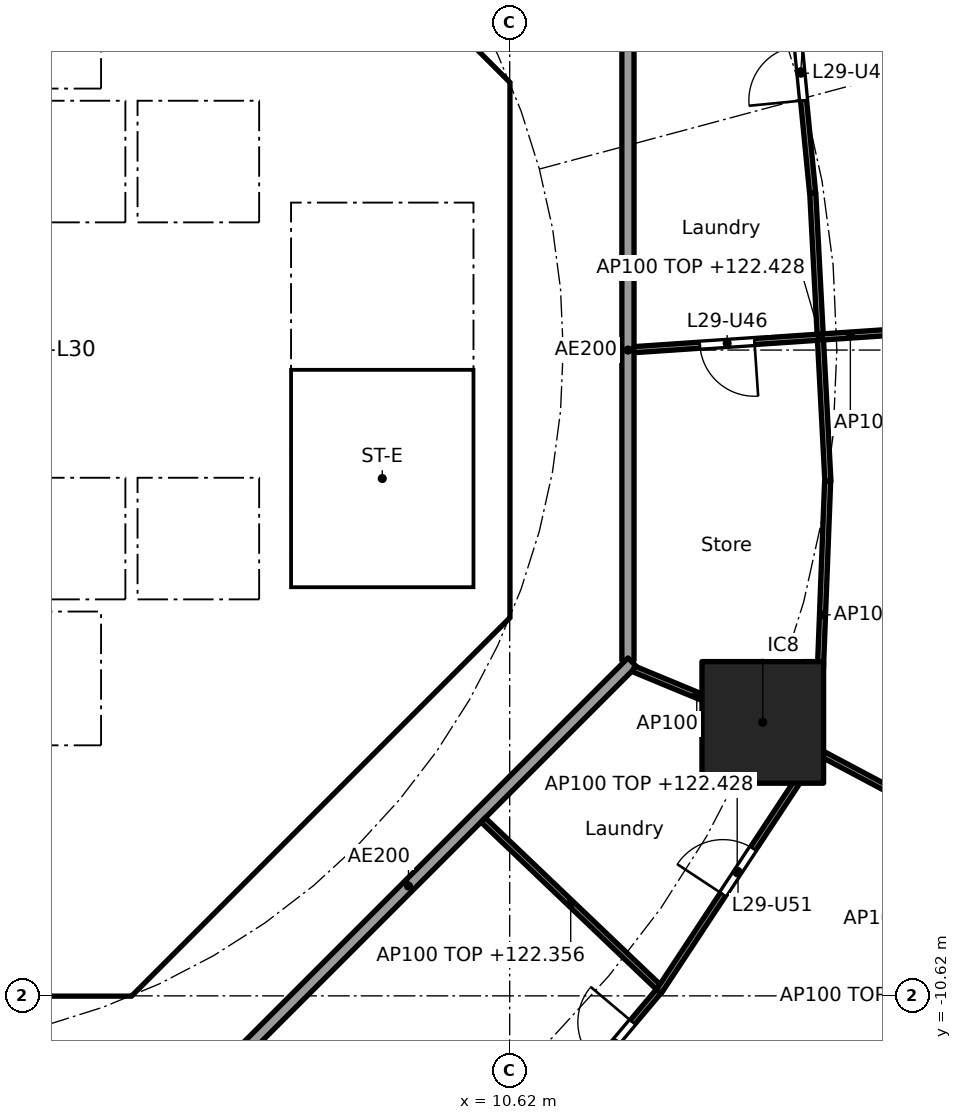
"""IFC4 building model, lengths in metres.
Left out: names, types, materials, properties, quantities, classifications, styles, units other than length and angle.
Written with IfcOpenShell. Run it as: python <this file> out.ifc"""

import sys

from ifc_helpers import new_model, si_unit, direction, frame, frame_2d, origin, origin_2d, place, context, subcontext, project, spatial, polyline, rectangle, outline, extrude, element, fill, save


model = new_model("IFC4")
c1 = context("Model", 3, precision=1e-05, world=origin(), true_north=direction((0.0, 1.0)))
c2 = subcontext(c1, "Body", "Model", "MODEL_VIEW")
j1 = project(units=[si_unit("LENGTHUNIT", "METRE"), si_unit("PLANEANGLEUNIT", "RADIAN")], contexts=[c1])
p1 = place(None, origin())
s1 = spatial("IfcSite", under=j1, at=p1, CompositionType="ELEMENT")
p2 = place(p1, origin())
s2 = spatial("IfcBuilding", under=s1, at=p2, CompositionType="ELEMENT")
p3 = place(p2, frame((0.0, 0.0, 119.6)))
s3 = spatial("IfcBuildingStorey", under=s2, at=p3, CompositionType="ELEMENT", Elevation=119.6)
p4 = place(p3, frame((14.782, -6.123, 0.0), z_axis=(0.0, 0.0, 1.0), x_axis=(1.0, 0.0, 0.0)))
e1 = element("IfcColumn", 1, at=p4, inside=s3, PredefinedType="COLUMN", context=c2, shape_type="SweptSolid", body=[
    extrude(rectangle(XDim=2.0, YDim=2.0, at=origin_2d()), origin(), (0.0, 0.0, 1.0), 3.7),
])
p5 = place(p3, frame((9.988, 4.613, 0.0), z_axis=(0.0, 0.0, 1.0), x_axis=(-0.707106781187, 0.707106781187, 0.0)))
e2 = element("IfcWall", 2, at=p5, inside=s3, PredefinedType="SHEAR", context=c2, shape_type="SweptSolid", body=[
    extrude(rectangle(XDim=7.602, YDim=0.6, at=frame_2d((3.801, 0.0))), origin(), (0.0, 0.0, 1.0), 3.44),
])
p6 = place(p5, frame((3.201, 0.0, 0.0)))
e3 = element("IfcOpeningElement", 3, at=p6, cuts=e2, PredefinedType="OPENING", context=c2, shape_type="SweptSolid", body=[
    extrude(rectangle(XDim=1.2, YDim=2.1, at=frame_2d((0.6, 1.05))), frame((0.0, 0.31, 0.0), z_axis=(0.0, -1.0, 0.0), x_axis=(1.0, 0.0, 0.0)), (0.0, 0.0, 1.0), 0.62),
])
p7 = place(p3, frame((4.613, -9.988, 0.0), z_axis=(0.0, 0.0, 1.0), x_axis=(0.707106781187, 0.707106781187, 0.0)))
e4 = element("IfcWall", 4, at=p7, inside=s3, PredefinedType="SHEAR", context=c2, shape_type="SweptSolid", body=[
    extrude(rectangle(XDim=7.602, YDim=0.6, at=frame_2d((3.801, 0.0))), origin(), (0.0, 0.0, 1.0), 3.44),
])
p8 = place(p7, frame((3.201, 0.0, 0.0)))
e5 = element("IfcOpeningElement", 5, at=p8, cuts=e4, PredefinedType="OPENING", context=c2, shape_type="SweptSolid", body=[
    extrude(rectangle(XDim=1.2, YDim=2.1, at=frame_2d((0.6, 1.05))), frame((0.0, 0.31, 0.0), z_axis=(0.0, -1.0, 0.0), x_axis=(1.0, 0.0, 0.0)), (0.0, 0.0, 1.0), 0.62),
])
p9 = place(p3, frame((4.0, 4.3, 0.0), z_axis=(0.0, 0.0, 1.0), x_axis=(0.0, 1.0, 0.0)))
e6 = element("IfcWall", 6, at=p9, inside=s3, PredefinedType="SOLIDWALL", context=c2, shape_type="SweptSolid", body=[
    extrude(rectangle(XDim=2.2, YDim=0.2, at=frame_2d((1.1, 0.0))), origin(), (0.0, 0.0, 1.0), 3.44),
])
p10 = place(p9, frame((0.55, 0.0, 0.0)))
e7 = element("IfcOpeningElement", 7, at=p10, cuts=e6, PredefinedType="OPENING", context=c2, shape_type="SweptSolid", body=[
    extrude(rectangle(XDim=1.1, YDim=2.1, at=frame_2d((0.55, 1.05))), frame((0.0, 0.11, 0.0), z_axis=(0.0, -1.0, 0.0), x_axis=(1.0, 0.0, 0.0)), (0.0, 0.0, 1.0), 0.22),
])
p11 = place(p3, frame((-6.7, 2.0, 0.0), z_axis=(0.0, 0.0, 1.0), x_axis=(1.0, 0.0, 0.0)))
e8 = element("IfcWall", 8, at=p11, inside=s3, PredefinedType="SOLIDWALL", context=c2, shape_type="SweptSolid", body=[
    extrude(rectangle(XDim=13.4, YDim=0.2, at=frame_2d((6.7, 0.0))), origin(), (0.0, 0.0, 1.0), 3.44),
])
p12 = place(p11, frame((0.65, 0.0, 0.0)))
e9 = element("IfcOpeningElement", 9, at=p12, cuts=e8, PredefinedType="OPENING", context=c2, shape_type="SweptSolid", body=[
    extrude(rectangle(XDim=1.1, YDim=2.1, at=frame_2d((0.55, 1.05))), frame((0.0, 0.11, 0.0), z_axis=(0.0, -1.0, 0.0), x_axis=(1.0, 0.0, 0.0)), (0.0, 0.0, 1.0), 0.22),
])
p13 = place(p11, frame((2.85, 0.0, 0.0)))
e10 = element("IfcOpeningElement", 10, at=p13, cuts=e8, PredefinedType="OPENING", context=c2, shape_type="SweptSolid", body=[
    extrude(rectangle(XDim=1.1, YDim=2.1, at=frame_2d((0.55, 1.05))), frame((0.0, 0.11, 0.0), z_axis=(0.0, -1.0, 0.0), x_axis=(1.0, 0.0, 0.0)), (0.0, 0.0, 1.0), 0.22),
])
p14 = place(p11, frame((5.05, 0.0, 0.0)))
e11 = element("IfcOpeningElement", 11, at=p14, cuts=e8, PredefinedType="OPENING", context=c2, shape_type="SweptSolid", body=[
    extrude(rectangle(XDim=1.1, YDim=2.1, at=frame_2d((0.55, 1.05))), frame((0.0, 0.11, 0.0), z_axis=(0.0, -1.0, 0.0), x_axis=(1.0, 0.0, 0.0)), (0.0, 0.0, 1.0), 0.22),
])
p15 = place(p3, frame((6.7, 4.0, 0.0), z_axis=(0.0, 0.0, 1.0), x_axis=(1.0, 0.0, 0.0)))
e12 = element("IfcWall", 12, at=p15, inside=s3, PredefinedType="SOLIDWALL", context=c2, shape_type="SweptSolid", body=[
    extrude(rectangle(XDim=3.325, YDim=0.2, at=frame_2d((1.662, 0.0))), origin(), (0.0, 0.0, 1.0), 3.44),
])
p16 = place(p15, frame((1.25, 0.0, 0.0)))
e13 = element("IfcOpeningElement", 13, at=p16, cuts=e12, PredefinedType="OPENING", context=c2, shape_type="SweptSolid", body=[
    extrude(rectangle(XDim=1.1, YDim=2.1, at=frame_2d((0.55, 1.05))), frame((0.0, 0.11, 0.0), z_axis=(0.0, -1.0, 0.0), x_axis=(1.0, 0.0, 0.0)), (0.0, 0.0, 1.0), 0.22),
])
p17 = place(p3, frame((4.0, -10.025, 0.0), z_axis=(0.0, 0.0, 1.0), x_axis=(0.0, 1.0, 0.0)))
e14 = element("IfcWall", 14, at=p17, inside=s3, PredefinedType="SOLIDWALL", context=c2, shape_type="SweptSolid", body=[
    extrude(rectangle(XDim=3.0, YDim=0.2, at=frame_2d((1.5, 0.0))), origin(), (0.0, 0.0, 1.0), 3.44),
])
p18 = place(p17, frame((0.975, 0.0, 0.0)))
e15 = element("IfcOpeningElement", 15, at=p18, cuts=e14, PredefinedType="OPENING", context=c2, shape_type="SweptSolid", body=[
    extrude(rectangle(XDim=1.1, YDim=2.1, at=frame_2d((0.55, 1.05))), frame((0.0, 0.11, 0.0), z_axis=(0.0, -1.0, 0.0), x_axis=(1.0, 0.0, 0.0)), (0.0, 0.0, 1.0), 0.22),
])
p19 = place(p3, frame((4.0, -6.5, 0.0), z_axis=(0.0, 0.0, 1.0), x_axis=(0.0, 1.0, 0.0)))
e16 = element("IfcWall", 16, at=p19, inside=s3, PredefinedType="SOLIDWALL", context=c2, shape_type="SweptSolid", body=[
    extrude(rectangle(XDim=2.2, YDim=0.2, at=frame_2d((1.1, 0.0))), origin(), (0.0, 0.0, 1.0), 3.44),
])
p20 = place(p19, frame((0.55, 0.0, 0.0)))
e17 = element("IfcOpeningElement", 17, at=p20, cuts=e16, PredefinedType="OPENING", context=c2, shape_type="SweptSolid", body=[
    extrude(rectangle(XDim=1.1, YDim=2.1, at=frame_2d((0.55, 1.05))), frame((0.0, 0.11, 0.0), z_axis=(0.0, -1.0, 0.0), x_axis=(1.0, 0.0, 0.0)), (0.0, 0.0, 1.0), 0.22),
])
p21 = place(p3, frame((-6.7, -2.0, 0.0), z_axis=(0.0, 0.0, 1.0), x_axis=(1.0, 0.0, 0.0)))
e18 = element("IfcWall", 18, at=p21, inside=s3, PredefinedType="SOLIDWALL", context=c2, shape_type="SweptSolid", body=[
    extrude(rectangle(XDim=13.4, YDim=0.2, at=frame_2d((6.7, 0.0))), origin(), (0.0, 0.0, 1.0), 3.44),
])
p22 = place(p21, frame((0.65, 0.0, 0.0)))
e19 = element("IfcOpeningElement", 19, at=p22, cuts=e18, PredefinedType="OPENING", context=c2, shape_type="SweptSolid", body=[
    extrude(rectangle(XDim=1.1, YDim=2.1, at=frame_2d((0.55, 1.05))), frame((0.0, 0.11, 0.0), z_axis=(0.0, -1.0, 0.0), x_axis=(1.0, 0.0, 0.0)), (0.0, 0.0, 1.0), 0.22),
])
p23 = place(p21, frame((2.85, 0.0, 0.0)))
e20 = element("IfcOpeningElement", 20, at=p23, cuts=e18, PredefinedType="OPENING", context=c2, shape_type="SweptSolid", body=[
    extrude(rectangle(XDim=1.1, YDim=2.1, at=frame_2d((0.55, 1.05))), frame((0.0, 0.11, 0.0), z_axis=(0.0, -1.0, 0.0), x_axis=(1.0, 0.0, 0.0)), (0.0, 0.0, 1.0), 0.22),
])
p24 = place(p3, origin())
e21 = element("IfcWall", 21, at=p24, inside=s3, PredefinedType="SHEAR", context=c2, shape_type="SweptSolid", body=[
    extrude(outline(polyline([(-4.152, -10.025), (4.152, -10.025), (4.401, -9.776), (4.825, -10.2), (4.401, -10.625), (-4.401, -10.625), (-4.825, -10.2), (-4.401, -9.776), (-4.152, -10.025)])), origin(), (0.0, 0.0, 1.0), 3.44),
])
p25 = place(p3, origin())
e22 = element("IfcWall", 22, at=p25, inside=s3, PredefinedType="SHEAR", context=c2, shape_type="SweptSolid", body=[
    extrude(outline(polyline([(9.776, -4.401), (10.025, -4.152), (10.025, -3.801), (10.025, 4.152), (9.776, 4.401), (10.2, 4.825), (10.625, 4.401), (10.625, -4.401), (10.2, -4.825), (9.776, -4.401)])), origin(), (0.0, 0.0, 1.0), 3.44),
])
p26 = place(p3, origin())
e23 = element("IfcWall", 23, at=p26, inside=s3, PredefinedType="SOLIDWALL", context=c2, shape_type="SweptSolid", body=[
    extrude(outline(polyline([(-6.7, -2.1), (-6.5, -2.1), (-6.5, -4.1), (-4.5, -4.1), (-4.5, -2.1), (-4.3, -2.1), (-4.3, -4.1), (-2.3, -4.1), (-2.3, -2.1), (-2.1, -2.1), (-2.1, -4.1), (-0.1, -4.1), (-0.1, -2.1), (0.1, -2.1), (0.1, -4.1), (2.1, -4.1), (2.1, -2.1), (2.3, -2.1), (2.3, -4.1), (4.3, -4.1), (4.3, -2.1), (4.5, -2.1), (4.5, -4.1), (6.5, -4.1), (6.5, -2.1), (6.7, -2.1), (6.7, -4.3), (-6.7, -4.3), (-6.7, -2.1)])), origin(), (0.0, 0.0, 1.0), 3.44),
])
p27 = place(p3, origin())
e24 = element("IfcWall", 24, at=p27, inside=s3, PredefinedType="SOLIDWALL", context=c2, shape_type="SweptSolid", body=[
    extrude(outline(polyline([(-6.5, 2.1), (-6.7, 2.1), (-6.7, 4.3), (6.7, 4.3), (6.7, 2.1), (6.5, 2.1), (6.5, 4.1), (4.5, 4.1), (4.5, 2.1), (4.3, 2.1), (4.3, 4.1), (2.3, 4.1), (2.3, 2.1), (2.1, 2.1), (2.1, 4.1), (0.1, 4.1), (0.1, 2.1), (-0.1, 2.1), (-0.1, 4.1), (-2.1, 4.1), (-2.1, 2.1), (-2.3, 2.1), (-2.3, 4.1), (-4.3, 4.1), (-4.3, 2.1), (-4.5, 2.1), (-4.5, 4.1), (-6.5, 4.1), (-6.5, 2.1)])), origin(), (0.0, 0.0, 1.0), 3.44),
])
p28 = place(p3, origin())
e25 = element("IfcWall", 25, at=p28, inside=s3, PredefinedType="SOLIDWALL", context=c2, shape_type="SweptSolid", body=[
    extrude(outline(polyline([(4.1, -7.025), (-4.1, -7.025), (-4.1, -6.5), (4.1, -6.5), (4.1, -7.025)])), origin(), (0.0, 0.0, 1.0), 3.44),
])
p29 = place(p3, origin())
e26 = element("IfcWall", 26, at=p29, inside=s3, PredefinedType="SOLIDWALL", context=c2, shape_type="SweptSolid", body=[
    extrude(outline(polyline([(7.025, -3.9), (6.7, -3.9), (6.7, 3.9), (7.025, 3.9), (7.025, -3.9)])), origin(), (0.0, 0.0, 1.0), 3.44),
])
p30 = place(p3, origin())
e27 = element("IfcWall", 27, at=p30, inside=s3, PredefinedType="SOLIDWALL", context=c2, shape_type="SweptSolid", body=[
    extrude(outline(polyline([(10.025, -4.1), (6.7, -4.1), (6.7, -3.9), (10.025, -3.9), (10.025, -4.1)])), origin(), (0.0, 0.0, 1.0), 3.44),
])
p31 = place(p3, frame((12.565, -5.104, 0.0), z_axis=(0.0, 0.0, 1.0), x_axis=(0.0, 1.0, 0.0)))
e28 = element("IfcWall", 28, at=p31, inside=s3, PredefinedType="PARTITIONING", context=c2, shape_type="SweptSolid", body=[
    extrude(rectangle(XDim=10.209, YDim=0.2, at=frame_2d((5.104, 0.0))), origin(), (0.0, 0.0, 1.0), 3.44),
])
p32 = place(p3, frame((5.275, -12.494, 0.0), z_axis=(0.0, 0.0, 1.0), x_axis=(0.707106781187, 0.707106781187, 0.0)))
e29 = element("IfcWall", 29, at=p32, inside=s3, PredefinedType="PARTITIONING", context=c2, shape_type="SweptSolid", body=[
    extrude(rectangle(XDim=10.409, YDim=0.2, at=frame_2d((5.205, 0.0))), origin(), (0.0, 0.0, 1.0), 3.44),
])
p33 = place(p3, frame((15.853, -2.158, 0.0), z_axis=(0.0, 0.0, 1.0), x_axis=(-0.052483289253, 0.99862180246, 0.0)))
e30 = element("IfcWall", 30, at=p33, inside=s3, PredefinedType="PARTITIONING", context=c2, shape_type="SweptSolid", body=[
    extrude(rectangle(XDim=4.75, YDim=0.1, at=frame_2d((2.375, 0.0))), origin(), (0.0, 0.0, 1.0), 2.828),
])
p34 = place(p3, frame((15.849, -2.158, 0.0), z_axis=(0.0, 0.0, 1.0), x_axis=(-0.038390448414, -0.999262815014, 0.0)))
e31 = element("IfcWall", 31, at=p34, inside=s3, PredefinedType="PARTITIONING", context=c2, shape_type="SweptSolid", body=[
    extrude(rectangle(XDim=4.394, YDim=0.1, at=frame_2d((2.197, 0.0))), origin(), (0.0, 0.0, 1.0), 3.44),
])
p35 = place(p3, frame((12.665, 0.007, 0.0), z_axis=(0.0, 0.0, 1.0), x_axis=(0.997737186236, 0.067234717233, 0.0)))
e32 = element("IfcWall", 32, at=p35, inside=s3, PredefinedType="PARTITIONING", context=c2, shape_type="SweptSolid", body=[
    extrude(rectangle(XDim=7.132, YDim=0.1, at=frame_2d((3.566, 0.0))), origin(), (0.0, 0.0, 1.0), 2.756),
])
p36 = place(p35, frame((4.651, 0.0, 0.0)))
e33 = element("IfcOpeningElement", 33, at=p36, cuts=e32, PredefinedType="OPENING", context=c2, shape_type="SweptSolid", body=[
    extrude(rectangle(XDim=0.9, YDim=2.1, at=frame_2d((0.45, 1.05))), frame((0.0, 0.06, 0.0), z_axis=(0.0, -1.0, 0.0), x_axis=(1.0, 0.0, 0.0)), (0.0, 0.0, 1.0), 0.12),
])
p37 = place(p35, frame((1.085, 0.0, 0.0)))
e34 = element("IfcOpeningElement", 34, at=p37, cuts=e32, PredefinedType="OPENING", context=c2, shape_type="SweptSolid", body=[
    extrude(rectangle(XDim=0.9, YDim=2.1, at=frame_2d((0.45, 1.05))), frame((0.0, 0.06, 0.0), z_axis=(0.0, -1.0, 0.0), x_axis=(1.0, 0.0, 0.0)), (0.0, 0.0, 1.0), 0.12),
])
p38 = place(p3, frame((15.602, 2.584, 0.0), z_axis=(0.0, 0.0, 1.0), x_axis=(-0.097216297846, 0.995263277446, 0.0)))
e35 = element("IfcWall", 35, at=p38, inside=s3, PredefinedType="PARTITIONING", context=c2, shape_type="SweptSolid", body=[
    extrude(rectangle(XDim=4.006, YDim=0.1, at=frame_2d((2.003, 0.0))), origin(), (0.0, 0.0, 1.0), 2.828),
])
p39 = place(p38, frame((1.528, 0.0, 0.0)))
e36 = element("IfcOpeningElement", 36, at=p39, cuts=e35, PredefinedType="OPENING", context=c2, shape_type="SweptSolid", body=[
    extrude(rectangle(XDim=0.9, YDim=2.1, at=frame_2d((0.45, 1.05))), frame((0.0, 0.06, 0.0), z_axis=(0.0, -1.0, 0.0), x_axis=(1.0, 0.0, 0.0)), (0.0, 0.0, 1.0), 0.12),
])
p40 = place(p3, frame((10.138, -14.026, 0.0), z_axis=(0.0, 0.0, 1.0), x_axis=(0.644051444483, 0.764982180746, 0.0)))
e37 = element("IfcWall", 37, at=p40, inside=s3, PredefinedType="PARTITIONING", context=c2, shape_type="SweptSolid", body=[
    extrude(rectangle(XDim=4.548, YDim=0.1, at=frame_2d((2.274, 0.0))), origin(), (0.0, 0.0, 1.0), 2.828),
])
p41 = place(p40, frame((2.986, 0.0, 0.0)))
e38 = element("IfcOpeningElement", 38, at=p41, cuts=e37, PredefinedType="OPENING", context=c2, shape_type="SweptSolid", body=[
    extrude(rectangle(XDim=0.9, YDim=2.1, at=frame_2d((0.45, 1.05))), frame((0.0, 0.06, 0.0), z_axis=(0.0, -1.0, 0.0), x_axis=(1.0, 0.0, 0.0)), (0.0, 0.0, 1.0), 0.12),
])
p42 = place(p3, frame((10.184, -7.727, 0.0), z_axis=(0.0, 0.0, 1.0), x_axis=(0.723654892782, -0.690162007179, 0.0)))
e39 = element("IfcWall", 39, at=p42, inside=s3, PredefinedType="PARTITIONING", context=c2, shape_type="SweptSolid", body=[
    extrude(rectangle(XDim=3.98, YDim=0.1, at=frame_2d((1.99, 0.0))), origin(), (0.0, 0.0, 1.0), 2.756),
])
p43 = place(p3, frame((13.072, -10.55, 0.0), z_axis=(0.0, 0.0, 1.0), x_axis=(0.550614843759, 0.834759422727, 0.0)))
e40 = element("IfcWall", 40, at=p43, inside=s3, PredefinedType="PARTITIONING", context=c2, shape_type="SweptSolid", body=[
    extrude(rectangle(XDim=4.683, YDim=0.1, at=frame_2d((2.341, 0.0))), origin(), (0.0, 0.0, 1.0), 2.828),
])
p44 = place(p43, frame((1.917, 0.0, 0.0)))
e41 = element("IfcOpeningElement", 41, at=p44, cuts=e40, PredefinedType="OPENING", context=c2, shape_type="SweptSolid", body=[
    extrude(rectangle(XDim=0.9, YDim=2.1, at=frame_2d((0.45, 1.05))), frame((0.0, 0.06, 0.0), z_axis=(0.0, -1.0, 0.0), x_axis=(1.0, 0.0, 0.0)), (0.0, 0.0, 1.0), 0.12),
])
p45 = place(p3, frame((12.657, -5.243, 0.0), z_axis=(0.0, 0.0, 1.0), x_axis=(0.923864733477, -0.382719158442, 0.0)))
e42 = element("IfcWall", 42, at=p45, inside=s3, PredefinedType="PARTITIONING", context=c2, shape_type="SweptSolid", body=[
    extrude(rectangle(XDim=2.25, YDim=0.1, at=frame_2d((1.125, 0.0))), origin(), (0.0, 0.0, 1.0), 3.44),
])
p46 = place(p3, frame((14.826, -6.146, 0.0), z_axis=(0.0, 0.0, 1.0), x_axis=(0.883012998471, -0.469348532044, 0.0)))
e43 = element("IfcWall", 43, at=p46, inside=s3, PredefinedType="PARTITIONING", context=c2, shape_type="SweptSolid", body=[
    extrude(rectangle(XDim=9.172, YDim=0.1, at=frame_2d((4.586, 0.0))), origin(), (0.0, 0.0, 1.0), 2.828),
])
p47 = place(p46, frame((2.728, 0.0, 0.0)))
e44 = element("IfcOpeningElement", 44, at=p47, cuts=e43, PredefinedType="OPENING", context=c2, shape_type="SweptSolid", body=[
    extrude(rectangle(XDim=0.9, YDim=2.1, at=frame_2d((0.45, 1.05))), frame((0.0, 0.06, 0.0), z_axis=(0.0, -1.0, 0.0), x_axis=(1.0, 0.0, 0.0)), (0.0, 0.0, 1.0), 0.12),
])
p48 = place(p10, origin())
e45 = element("IfcDoor", 45, at=p48, inside=s3, OperationType="DOUBLE_DOOR_SLIDING", PredefinedType="DOOR", context=c2, shape_type="SweptSolid", body=[
    extrude(rectangle(XDim=1.1, YDim=2.1, at=frame_2d((0.55, 1.05))), frame((0.0, 0.025, 0.0), z_axis=(0.0, -1.0, 0.0), x_axis=(1.0, 0.0, 0.0)), (0.0, 0.0, 1.0), 0.05),
])
fill(e7, e45)
p49 = place(p20, origin())
e46 = element("IfcDoor", 46, at=p49, inside=s3, OperationType="DOUBLE_DOOR_SLIDING", PredefinedType="DOOR", context=c2, shape_type="SweptSolid", body=[
    extrude(rectangle(XDim=1.1, YDim=2.1, at=frame_2d((0.55, 1.05))), frame((0.0, 0.025, 0.0), z_axis=(0.0, -1.0, 0.0), x_axis=(1.0, 0.0, 0.0)), (0.0, 0.0, 1.0), 0.05),
])
fill(e17, e46)
p50 = place(p16, frame((1.1, 0.0, 0.0), x_axis=(-1.0, 0.0, 0.0)))
e47 = element("IfcDoor", 47, at=p50, inside=s3, OperationType="SINGLE_SWING_LEFT", PredefinedType="DOOR", context=c2, shape_type="SweptSolid", body=[
    extrude(rectangle(XDim=1.1, YDim=2.1, at=frame_2d((0.55, 1.05))), frame((0.0, 0.025, 0.0), z_axis=(0.0, -1.0, 0.0), x_axis=(1.0, 0.0, 0.0)), (0.0, 0.0, 1.0), 0.05),
])
fill(e13, e47)
p51 = place(p18, origin())
e48 = element("IfcDoor", 48, at=p51, inside=s3, OperationType="SINGLE_SWING_LEFT", PredefinedType="DOOR", context=c2, shape_type="SweptSolid", body=[
    extrude(rectangle(XDim=1.1, YDim=2.1, at=frame_2d((0.55, 1.05))), frame((0.0, 0.025, 0.0), z_axis=(0.0, -1.0, 0.0), x_axis=(1.0, 0.0, 0.0)), (0.0, 0.0, 1.0), 0.05),
])
fill(e15, e48)
p52 = place(p8, origin())
e49 = element("IfcDoor", 49, at=p52, inside=s3, OperationType="SINGLE_SWING_RIGHT", PredefinedType="DOOR", context=c2, shape_type="SweptSolid", body=[
    extrude(rectangle(XDim=1.2, YDim=2.1, at=frame_2d((0.6, 1.05))), frame((0.0, 0.025, 0.0), z_axis=(0.0, -1.0, 0.0), x_axis=(1.0, 0.0, 0.0)), (0.0, 0.0, 1.0), 0.05),
])
fill(e5, e49)
p53 = place(p39, origin())
e50 = element("IfcDoor", 50, at=p53, inside=s3, OperationType="SINGLE_SWING_LEFT", PredefinedType="DOOR", context=c2, shape_type="SweptSolid", body=[
    extrude(rectangle(XDim=0.9, YDim=2.1, at=frame_2d((0.45, 1.05))), frame((0.0, 0.025, 0.0), z_axis=(0.0, -1.0, 0.0), x_axis=(1.0, 0.0, 0.0)), (0.0, 0.0, 1.0), 0.05),
])
fill(e36, e50)
p54 = place(p37, frame((0.9, 0.0, 0.0), x_axis=(-1.0, 0.0, 0.0)))
e51 = element("IfcDoor", 51, at=p54, inside=s3, OperationType="SINGLE_SWING_LEFT", PredefinedType="DOOR", context=c2, shape_type="SweptSolid", body=[
    extrude(rectangle(XDim=0.9, YDim=2.1, at=frame_2d((0.45, 1.05))), frame((0.0, 0.025, 0.0), z_axis=(0.0, -1.0, 0.0), x_axis=(1.0, 0.0, 0.0)), (0.0, 0.0, 1.0), 0.05),
])
fill(e34, e51)
p55 = place(p41, origin())
e52 = element("IfcDoor", 52, at=p55, inside=s3, OperationType="SINGLE_SWING_RIGHT", PredefinedType="DOOR", context=c2, shape_type="SweptSolid", body=[
    extrude(rectangle(XDim=0.9, YDim=2.1, at=frame_2d((0.45, 1.05))), frame((0.0, 0.025, 0.0), z_axis=(0.0, -1.0, 0.0), x_axis=(1.0, 0.0, 0.0)), (0.0, 0.0, 1.0), 0.05),
])
fill(e38, e52)
p56 = place(p44, origin())
e53 = element("IfcDoor", 53, at=p56, inside=s3, OperationType="SINGLE_SWING_LEFT", PredefinedType="DOOR", context=c2, shape_type="SweptSolid", body=[
    extrude(rectangle(XDim=0.9, YDim=2.1, at=frame_2d((0.45, 1.05))), frame((0.0, 0.025, 0.0), z_axis=(0.0, -1.0, 0.0), x_axis=(1.0, 0.0, 0.0)), (0.0, 0.0, 1.0), 0.05),
])
fill(e41, e53)
save(model, sys.argv[1])
